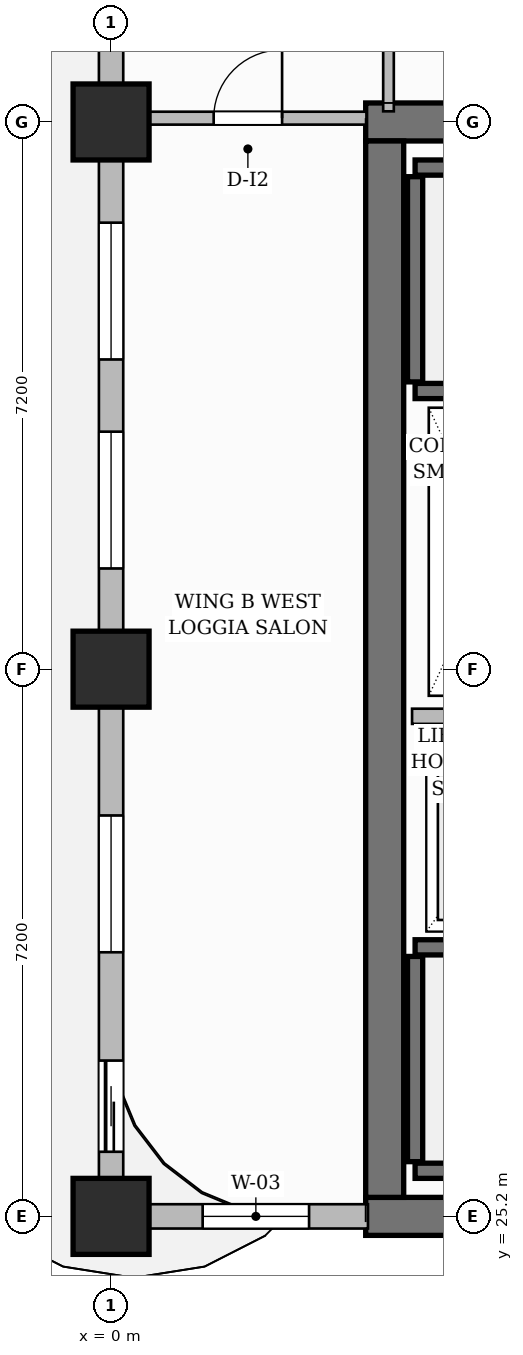
"""IFC4 building model, lengths in metres.
Left out: names, types, materials, properties, quantities, classifications, styles, units other than length and angle.
Written with IfcOpenShell. Run it as: python <this file> out.ifc"""

import sys

from ifc_helpers import new_model, si_unit, direction, frame, frame_2d, origin, origin_2d, place, context, subcontext, project, spatial, rectangle, extrude, source, transform, mapped, element, fill, save


model = new_model("IFC4")
c1 = context("Model", 3, precision=1e-05, world=origin(), true_north=direction((0.0, 1.0)))
c2 = subcontext(c1, "Body", "Model", "MODEL_VIEW")
j1 = project(units=[si_unit("LENGTHUNIT", "METRE"), si_unit("PLANEANGLEUNIT", "RADIAN")], contexts=[c1])
p1 = place(None, origin())
s1 = spatial("IfcSite", under=j1, at=p1, CompositionType="ELEMENT")
p2 = place(p1, origin())
s2 = spatial("IfcBuilding", under=s1, at=p2, CompositionType="ELEMENT")
p3 = place(p2, frame((0.0, 0.0, 192.65)))
s3 = spatial("IfcBuildingStorey", under=s2, at=p3, CompositionType="ELEMENT", Elevation=192.65)
for number, where, z_axis, x_axis in (
    (1, (3.35, 25.2, 0.0), (0.0, 0.0, 1.0), (1.0, 0.0, 0.0)),
    (2, (3.35, 39.6, 0.0), (0.0, 0.0, 1.0), (1.0, 0.0, 0.0)),
):
    element("IfcWall", number, at=place(p3, frame(where, z_axis=z_axis, x_axis=x_axis)), inside=s3, PredefinedType="SHEAR", context=c2, shape_type="SweptSolid", body=[
        extrude(rectangle(XDim=8.3, YDim=0.5, at=frame_2d((4.15, 0.0))), origin(), (0.0, 0.0, 1.0), 3.85),
    ])
p4 = place(p3, frame((3.6, 25.45, 0.0), z_axis=(0.0, 0.0, 1.0), x_axis=(0.0, 1.0, 0.0)))
e3 = element("IfcWall", 3, at=p4, inside=s3, PredefinedType="SHEAR", context=c2, shape_type="SweptSolid", body=[
    extrude(rectangle(XDim=13.9, YDim=0.5, at=frame_2d((6.95, 0.0))), origin(), (0.0, 0.0, 1.0), 3.85),
])
m1 = source(origin(), c2, "Body", "SweptSolid", [
    extrude(rectangle(XDim=1.0, YDim=1.0, at=origin_2d()), origin(), (0.0, 0.0, 1.0), 3.85),
])
for number, where, z_axis, x_axis in (
    (4, (0.0, 25.2, 0.0), (0.0, 0.0, 1.0), (1.0, 0.0, 0.0)),
    (5, (0.0, 32.4, 0.0), (0.0, 0.0, 1.0), (1.0, 0.0, 0.0)),
    (6, (0.0, 39.6, 0.0), (0.0, 0.0, 1.0), (1.0, 0.0, 0.0)),
):
    element("IfcColumn", number, at=place(p3, frame(where, z_axis=z_axis, x_axis=x_axis)), inside=s3, PredefinedType="COLUMN", context=c2, shape_type="MappedRepresentation", body=[
        mapped(m1, transform((0.0, 0.0, 0.0), scale=1.0)),
    ])
p5 = place(p3, frame((4.0, 25.8, 0.0), z_axis=(0.0, 0.0, 1.0), x_axis=(1.0, 0.0, 0.0)))
e7 = element("IfcWall", 7, at=p5, inside=s3, PredefinedType="SHEAR", context=c2, shape_type="SweptSolid", body=[
    extrude(rectangle(XDim=7.1, YDim=0.2, at=frame_2d((3.55, 0.0))), origin(), (0.0, 0.0, 1.0), 3.85),
])
p6 = place(p3, frame((4.0, 25.92, 0.0), z_axis=(0.0, 0.0, 1.0), x_axis=(0.0, 1.0, 0.0)))
e8 = element("IfcWall", 8, at=p6, inside=s3, PredefinedType="SHEAR", context=c2, shape_type="SweptSolid", body=[
    extrude(rectangle(XDim=2.7, YDim=0.2, at=frame_2d((1.35, 0.0))), origin(), (0.0, 0.0, 1.0), 3.85),
])
p7 = place(p3, frame((4.0, 28.74, 0.0), z_axis=(0.0, 0.0, 1.0), x_axis=(1.0, 0.0, 0.0)))
e9 = element("IfcWall", 9, at=p7, inside=s3, PredefinedType="SHEAR", context=c2, shape_type="SweptSolid", body=[
    extrude(rectangle(XDim=7.1, YDim=0.2, at=frame_2d((3.55, 0.0))), origin(), (0.0, 0.0, 1.0), 3.85),
])
p8 = place(p7, frame((5.815, 0.0, 0.0)))
e10 = element("IfcOpeningElement", 10, at=p8, cuts=e9, PredefinedType="OPENING", context=c2, shape_type="SweptSolid", body=[
    extrude(rectangle(XDim=1.05, YDim=2.2, at=frame_2d((0.525, 1.1))), frame((0.0, 0.11, 0.0), z_axis=(0.0, -1.0, 0.0), x_axis=(1.0, 0.0, 0.0)), (0.0, 0.0, 1.0), 0.22),
])
p9 = place(p3, frame((4.0, 39.0, 0.0), z_axis=(0.0, 0.0, 1.0), x_axis=(1.0, 0.0, 0.0)))
e11 = element("IfcWall", 11, at=p9, inside=s3, PredefinedType="SHEAR", context=c2, shape_type="SweptSolid", body=[
    extrude(rectangle(XDim=7.1, YDim=0.2, at=frame_2d((3.55, 0.0))), origin(), (0.0, 0.0, 1.0), 3.85),
])
p10 = place(p3, frame((4.0, 36.18, 0.0), z_axis=(0.0, 0.0, 1.0), x_axis=(0.0, 1.0, 0.0)))
e12 = element("IfcWall", 12, at=p10, inside=s3, PredefinedType="SHEAR", context=c2, shape_type="SweptSolid", body=[
    extrude(rectangle(XDim=2.7, YDim=0.2, at=frame_2d((1.35, 0.0))), origin(), (0.0, 0.0, 1.0), 3.85),
])
p11 = place(p3, frame((4.0, 36.06, 0.0), z_axis=(0.0, 0.0, 1.0), x_axis=(1.0, 0.0, 0.0)))
e13 = element("IfcWall", 13, at=p11, inside=s3, PredefinedType="SHEAR", context=c2, shape_type="SweptSolid", body=[
    extrude(rectangle(XDim=7.1, YDim=0.2, at=frame_2d((3.55, 0.0))), origin(), (0.0, 0.0, 1.0), 3.85),
])
p12 = place(p11, frame((5.815, 0.0, 0.0)))
e14 = element("IfcOpeningElement", 14, at=p12, cuts=e13, PredefinedType="OPENING", context=c2, shape_type="SweptSolid", body=[
    extrude(rectangle(XDim=1.05, YDim=2.2, at=frame_2d((0.525, 1.1))), frame((0.0, 0.11, 0.0), z_axis=(0.0, -1.0, 0.0), x_axis=(1.0, 0.0, 0.0)), (0.0, 0.0, 1.0), 0.22),
])
p13 = place(p3, frame((3.96, 31.78, 0.0), z_axis=(0.0, 0.0, 1.0), x_axis=(1.0, 0.0, 0.0)))
e15 = element("IfcWall", 15, at=p13, inside=s3, PredefinedType="PARTITIONING", context=c2, shape_type="SweptSolid", body=[
    extrude(rectangle(XDim=2.13, YDim=0.2, at=frame_2d((1.065, 0.0))), origin(), (0.0, 0.0, 1.0), 3.55),
])
p14 = place(p3, frame((0.24, 39.65, 0.0), z_axis=(0.0, 0.0, 1.0), x_axis=(1.0, 0.0, 0.0)))
e16 = element("IfcWall", 16, at=p14, inside=s3, PredefinedType="PARTITIONING", context=c2, shape_type="SweptSolid", body=[
    extrude(rectangle(XDim=3.12, YDim=0.17, at=frame_2d((1.56, 0.0))), origin(), (0.0, 0.0, 1.0), 3.55),
])
p15 = place(p14, frame((1.11, 0.0, 0.0)))
e17 = element("IfcOpeningElement", 17, at=p15, cuts=e16, PredefinedType="OPENING", context=c2, shape_type="SweptSolid", body=[
    extrude(rectangle(XDim=0.9, YDim=2.15, at=frame_2d((0.45, 1.075))), frame((0.0, 0.095, 0.0), z_axis=(0.0, -1.0, 0.0), x_axis=(1.0, 0.0, 0.0)), (0.0, 0.0, 1.0), 0.19),
])
p16 = place(p3, frame((3.65, 39.74, 0.0), z_axis=(0.0, 0.0, 1.0), x_axis=(0.0, 1.0, 0.0)))
e18 = element("IfcWall", 18, at=p16, inside=s3, PredefinedType="PARTITIONING", context=c2, shape_type="SweptSolid", body=[
    extrude(rectangle(XDim=1.745, YDim=0.14, at=frame_2d((0.873, 0.0))), origin(), (0.0, 0.0, 1.0), 3.55),
])
p17 = place(p3, frame((0.0, 25.2, 0.0), z_axis=(0.0, 0.0, 1.0), x_axis=(1.0, 0.0, 0.0)))
e19 = element("IfcWall", 19, at=p17, inside=s3, PredefinedType="SOLIDWALL", context=c2, shape_type="SweptSolid", body=[
    extrude(rectangle(XDim=3.38, YDim=0.32, at=frame_2d((1.69, 0.0))), origin(), (0.0, 0.0, 1.0), 3.55),
])
p18 = place(p17, frame((1.205, 0.0, 0.8)))
e20 = element("IfcOpeningElement", 20, at=p18, cuts=e19, PredefinedType="OPENING", context=c2, shape_type="SweptSolid", body=[
    extrude(rectangle(XDim=1.4, YDim=1.85, at=frame_2d((0.7, 0.925))), frame((0.0, 0.17, 0.0), z_axis=(0.0, -1.0, 0.0), x_axis=(1.0, 0.0, 0.0)), (0.0, 0.0, 1.0), 0.34),
])
p19 = place(p3, frame((0.0, 25.25, 0.0), z_axis=(0.0, 0.0, 1.0), x_axis=(0.0, 1.0, 0.0)))
e21 = element("IfcWall", 21, at=p19, inside=s3, PredefinedType="SOLIDWALL", context=c2, shape_type="SweptSolid", body=[
    extrude(rectangle(XDim=21.5, YDim=0.32, at=frame_2d((10.75, 0.0))), origin(), (0.0, 0.0, 1.0), 3.035),
])
p20 = place(p19, frame((18.607, 0.0, 0.0)))
e22 = element("IfcOpeningElement", 22, at=p20, cuts=e21, PredefinedType="OPENING", context=c2, shape_type="SweptSolid", body=[
    extrude(rectangle(XDim=1.2, YDim=2.2, at=frame_2d((0.6, 1.1))), frame((0.0, 0.17, 0.0), z_axis=(0.0, -1.0, 0.0), x_axis=(1.0, 0.0, 0.0)), (0.0, 0.0, 1.0), 0.34),
])
p21 = place(p19, frame((0.8, 0.0, 0.0)))
e23 = element("IfcOpeningElement", 23, at=p21, cuts=e21, PredefinedType="OPENING", context=c2, shape_type="SweptSolid", body=[
    extrude(rectangle(XDim=1.2, YDim=2.2, at=frame_2d((0.6, 1.1))), frame((0.0, 0.17, 0.0), z_axis=(0.0, -1.0, 0.0), x_axis=(1.0, 0.0, 0.0)), (0.0, 0.0, 1.0), 0.34),
])
p22 = place(p19, frame((3.425, 0.0, 0.8)))
e24 = element("IfcOpeningElement", 24, at=p22, cuts=e21, PredefinedType="OPENING", context=c2, shape_type="SweptSolid", body=[
    extrude(rectangle(XDim=1.8, YDim=1.85, at=frame_2d((0.9, 0.925))), frame((0.0, 0.17, 0.0), z_axis=(0.0, -1.0, 0.0), x_axis=(1.0, 0.0, 0.0)), (0.0, 0.0, 1.0), 0.34),
])
p23 = place(p19, frame((8.475, 0.0, 0.8)))
e25 = element("IfcOpeningElement", 25, at=p23, cuts=e21, PredefinedType="OPENING", context=c2, shape_type="SweptSolid", body=[
    extrude(rectangle(XDim=1.8, YDim=1.85, at=frame_2d((0.9, 0.925))), frame((0.0, 0.17, 0.0), z_axis=(0.0, -1.0, 0.0), x_axis=(1.0, 0.0, 0.0)), (0.0, 0.0, 1.0), 0.34),
])
p24 = place(p19, frame((11.225, 0.0, 0.8)))
e26 = element("IfcOpeningElement", 26, at=p24, cuts=e21, PredefinedType="OPENING", context=c2, shape_type="SweptSolid", body=[
    extrude(rectangle(XDim=1.8, YDim=1.85, at=frame_2d((0.9, 0.925))), frame((0.0, 0.17, 0.0), z_axis=(0.0, -1.0, 0.0), x_axis=(1.0, 0.0, 0.0)), (0.0, 0.0, 1.0), 0.34),
])
p25 = place(p19, frame((15.621, 0.0, 0.8)))
e27 = element("IfcOpeningElement", 27, at=p25, cuts=e21, PredefinedType="OPENING", context=c2, shape_type="SweptSolid", body=[
    extrude(rectangle(XDim=1.8, YDim=1.85, at=frame_2d((0.9, 0.925))), frame((0.0, 0.17, 0.0), z_axis=(0.0, -1.0, 0.0), x_axis=(1.0, 0.0, 0.0)), (0.0, 0.0, 1.0), 0.34),
])
m2 = source(origin(), c2, "Body", "SweptSolid", [
    extrude(rectangle(XDim=0.9, YDim=2.15, at=frame_2d((0.45, 1.075))), frame((0.0, 0.025, 0.0), z_axis=(0.0, -1.0, 0.0), x_axis=(1.0, 0.0, 0.0)), (0.0, 0.0, 1.0), 0.05),
])
p26 = place(p15, origin())
e28 = element("IfcDoor", 28, at=p26, inside=s3, OperationType="SINGLE_SWING_RIGHT", PredefinedType="DOOR", context=c2, shape_type="MappedRepresentation", body=[
    mapped(m2, transform((0.0, 0.0, 0.0), scale=1.0)),
])
fill(e17, e28)
m3 = source(origin(), c2, "Body", "SweptSolid", [
    extrude(rectangle(XDim=1.2, YDim=2.2, at=frame_2d((0.6, 1.1))), frame((0.0, 0.025, 0.0), z_axis=(0.0, -1.0, 0.0), x_axis=(1.0, 0.0, 0.0)), (0.0, 0.0, 1.0), 0.05),
])
p27 = place(p21, origin())
e29 = element("IfcDoor", 29, at=p27, inside=s3, OperationType="SLIDING_TO_LEFT", PredefinedType="DOOR", context=c2, shape_type="MappedRepresentation", body=[
    mapped(m3, transform((0.0, 0.0, 0.0), scale=1.0)),
])
fill(e23, e29)
m4 = source(origin(), c2, "Body", "SweptSolid", [
    extrude(rectangle(XDim=1.4, YDim=1.85, at=frame_2d((0.7, 0.925))), frame((0.0, 0.03, 0.0), z_axis=(0.0, -1.0, 0.0), x_axis=(1.0, 0.0, 0.0)), (0.0, 0.0, 1.0), 0.06),
])
p28 = place(p18, origin())
e30 = element("IfcWindow", 30, at=p28, inside=s3, PartitioningType="SINGLE_PANEL", PredefinedType="WINDOW", context=c2, shape_type="MappedRepresentation", body=[
    mapped(m4, transform((0.0, 0.0, 0.0), scale=1.0)),
])
fill(e20, e30)
m5 = source(origin(), c2, "Body", "SweptSolid", [
    extrude(rectangle(XDim=1.8, YDim=1.85, at=frame_2d((0.9, 0.925))), frame((0.0, 0.03, 0.0), z_axis=(0.0, -1.0, 0.0), x_axis=(1.0, 0.0, 0.0)), (0.0, 0.0, 1.0), 0.06),
])
p29 = place(p22, origin())
e31 = element("IfcWindow", 31, at=p29, inside=s3, PartitioningType="DOUBLE_PANEL_VERTICAL", PredefinedType="WINDOW", context=c2, shape_type="MappedRepresentation", body=[
    mapped(m5, transform((0.0, 0.0, 0.0), scale=1.0)),
])
fill(e24, e31)
p30 = place(p23, origin())
e32 = element("IfcWindow", 32, at=p30, inside=s3, PartitioningType="DOUBLE_PANEL_VERTICAL", PredefinedType="WINDOW", context=c2, shape_type="MappedRepresentation", body=[
    mapped(m5, transform((0.0, 0.0, 0.0), scale=1.0)),
])
fill(e25, e32)
p31 = place(p24, origin())
e33 = element("IfcWindow", 33, at=p31, inside=s3, PartitioningType="DOUBLE_PANEL_VERTICAL", PredefinedType="WINDOW", context=c2, shape_type="MappedRepresentation", body=[
    mapped(m5, transform((0.0, 0.0, 0.0), scale=1.0)),
])
fill(e26, e33)
save(model, sys.argv[1])
